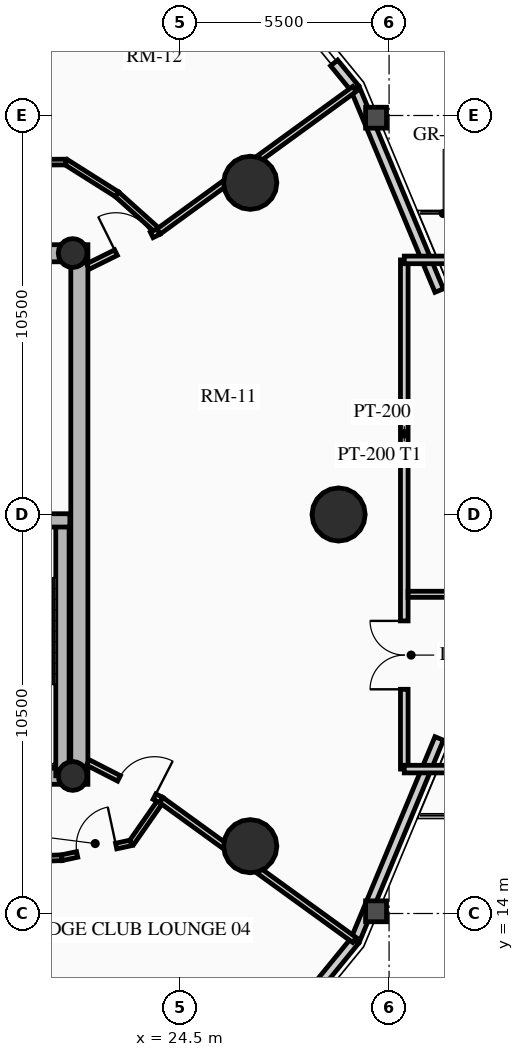
"""IFC4 building model, lengths in metres.
Left out: names, types, materials, properties, quantities, classifications, styles, units other than length and angle.
Written with IfcOpenShell. Run it as: python <this file> out.ifc"""

import sys

from ifc_helpers import new_model, si_unit, direction, frame, frame_2d, origin, origin_2d, place, context, subcontext, project, spatial, rectangle, circle, hollow_circle, extrude, source, transform, mapped, element, fill, save


model = new_model("IFC4")
c1 = context("Model", 3, precision=1e-05, world=origin(), true_north=direction((0.0, 1.0)))
c2 = subcontext(c1, "Body", "Model", "MODEL_VIEW")
j1 = project(units=[si_unit("LENGTHUNIT", "METRE"), si_unit("PLANEANGLEUNIT", "RADIAN")], contexts=[c1])
p1 = place(None, origin())
s1 = spatial("IfcSite", under=j1, at=p1, CompositionType="ELEMENT")
p2 = place(p1, origin())
s2 = spatial("IfcBuilding", under=s1, at=p2, CompositionType="ELEMENT")
p3 = place(p2, frame((0.0, 0.0, 136.6)))
s3 = spatial("IfcBuildingStorey", under=s2, at=p3, CompositionType="ELEMENT", Elevation=136.6)
p4 = place(p3, frame((21.85, 17.4, 0.0), z_axis=(0.0, 0.0, 1.0), x_axis=(0.0, 1.0, 0.0)))
e1 = element("IfcWall", 1, at=p4, inside=s3, PredefinedType="SHEAR", context=c2, shape_type="SweptSolid", body=[
    extrude(rectangle(XDim=14.2, YDim=0.45, at=frame_2d((7.1, 0.0))), origin(), (0.0, 0.0, 1.0), 3.72),
])
p5 = place(p3, frame((11.15, 17.625, 0.0), z_axis=(0.0, 0.0, 1.0), x_axis=(1.0, 0.0, 0.0)))
e2 = element("IfcWall", 2, at=p5, inside=s3, PredefinedType="SHEAR", context=c2, shape_type="SweptSolid", body=[
    extrude(rectangle(XDim=10.7, YDim=0.45, at=frame_2d((5.35, 0.0))), origin(), (0.0, 0.0, 1.0), 3.72),
])
m1 = source(origin(), c2, "Body", "SweptSolid", [
    extrude(rectangle(XDim=1.5, YDim=2.02, at=frame_2d((0.75, 1.01))), frame((0.0, 0.235, 0.0), z_axis=(0.0, -1.0, 0.0), x_axis=(1.0, 0.0, 0.0)), (0.0, 0.0, 1.0), 0.47),
])
p6 = place(p5, frame((5.45, 0.0, 0.0)))
e3 = element("IfcOpeningElement", 3, at=p6, cuts=e2, PredefinedType="OPENING", context=c2, shape_type="MappedRepresentation", body=[
    mapped(m1, transform((0.0, 0.0, 0.0), x_axis=(1.0, 0.0, 0.0), y_axis=(0.0, 1.0, 0.0), z_axis=(0.0, 0.0, 1.0), scale=1.0)),
])
p7 = place(p3, frame((11.15, 31.375, 0.0), z_axis=(0.0, 0.0, 1.0), x_axis=(1.0, 0.0, 0.0)))
e4 = element("IfcWall", 4, at=p7, inside=s3, PredefinedType="SHEAR", context=c2, shape_type="SweptSolid", body=[
    extrude(rectangle(XDim=10.7, YDim=0.45, at=frame_2d((5.35, 0.0))), origin(), (0.0, 0.0, 1.0), 3.72),
])
p8 = place(p7, frame((4.6, 0.0, 0.0)))
e5 = element("IfcOpeningElement", 5, at=p8, cuts=e4, PredefinedType="OPENING", context=c2, shape_type="MappedRepresentation", body=[
    mapped(m1, transform((0.0, 0.0, 0.0), x_axis=(1.0, 0.0, 0.0), y_axis=(0.0, 1.0, 0.0), z_axis=(0.0, 0.0, 1.0), scale=1.0)),
])
p9 = place(p3, frame((21.405, 17.625, 0.0), z_axis=(0.0, 0.0, 1.0), x_axis=(0.0, 1.0, 0.0)))
e6 = element("IfcWall", 6, at=p9, inside=s3, PredefinedType="SHEAR", context=c2, shape_type="SweptSolid", body=[
    extrude(rectangle(XDim=6.72, YDim=0.35, at=frame_2d((3.36, 0.0))), origin(), (0.0, 0.0, 1.0), 3.72),
])
p10 = place(p3, frame((18.315, 24.345, 0.0), z_axis=(0.0, 0.0, 1.0), x_axis=(1.0, 0.0, 0.0)))
e7 = element("IfcWall", 7, at=p10, inside=s3, PredefinedType="SHEAR", context=c2, shape_type="SweptSolid", body=[
    extrude(rectangle(XDim=3.285, YDim=0.35, at=frame_2d((1.643, 0.0))), origin(), (0.0, 0.0, 1.0), 3.72),
])
for number, where, z_axis, x_axis in (
    (8, (21.675, 17.62, 0.0), (0.0, 0.0, 1.0), (1.0, 0.0, 0.0)),
    (9, (21.675, 31.38, 0.0), (0.0, 0.0, 1.0), (1.0, 0.0, 0.0)),
):
    element("IfcColumn", number, at=place(p3, frame(where, z_axis=z_axis, x_axis=x_axis)), inside=s3, PredefinedType="COLUMN", context=c2, shape_type="SweptSolid", body=[
        extrude(hollow_circle(Radius=0.38, WallThickness=0.032, at=origin_2d()), origin(), (0.0, 0.0, 1.0), 3.72),
    ])
for number, where, z_axis, x_axis in (
    (10, (28.672, 24.5, 0.0), (0.0, 0.0, 1.0), (1.0, 0.0, 0.0)),
    (11, (26.347, 33.229, 0.0), (0.0, 0.0, 1.0), (1.0, 0.0, 0.0)),
    (12, (26.347, 15.771, 0.0), (0.0, 0.0, 1.0), (1.0, 0.0, 0.0)),
):
    element("IfcColumn", number, at=place(p3, frame(where, z_axis=z_axis, x_axis=x_axis)), inside=s3, PredefinedType="USERDEFINED", context=c2, shape_type="SweptSolid", body=[
        extrude(circle(Radius=0.7, at=origin_2d()), origin(), (0.0, 0.0, 1.0), 3.72),
    ])
p11 = place(p3, frame((29.105, 35.709, 0.0), z_axis=(0.0, 0.0, 1.0), x_axis=(0.384344417632, -0.923189779317, 0.0)))
e13 = element("IfcWall", 13, at=p11, inside=s3, PredefinedType="SOLIDWALL", context=c2, shape_type="SweptSolid", body=[
    extrude(rectangle(XDim=5.758, YDim=0.24, at=frame_2d((2.879, 0.0))), origin(), (0.0, 0.0, 1.0), 2.949),
])
p12 = place(p3, frame((28.555, 36.383, 0.0), z_axis=(0.0, 0.0, 1.0), x_axis=(0.632702874536, -0.774394649099, 0.0)))
e14 = element("IfcWall", 14, at=p12, inside=s3, PredefinedType="SOLIDWALL", context=c2, shape_type="SweptSolid", body=[
    extrude(rectangle(XDim=0.87, YDim=0.24, at=frame_2d((0.435, 0.0))), origin(), (0.0, 0.0, 1.0), 2.949),
])
p13 = place(p3, frame((29.105, 13.291, 0.0), z_axis=(0.0, 0.0, 1.0), x_axis=(-0.632700781152, -0.77439635945, 0.0)))
e15 = element("IfcWall", 15, at=p13, inside=s3, PredefinedType="SOLIDWALL", context=c2, shape_type="SweptSolid", body=[
    extrude(rectangle(XDim=5.448, YDim=0.24, at=frame_2d((2.724, 0.0))), origin(), (0.0, 0.0, 1.0), 2.949),
])
m2 = source(origin(), c2, "Body", "SweptSolid", [
    extrude(rectangle(XDim=2.2, YDim=1.35, at=frame_2d((1.1, 0.675))), frame((0.0, 0.13, 0.0), z_axis=(0.0, -1.0, 0.0), x_axis=(1.0, 0.0, 0.0)), (0.0, 0.0, 1.0), 0.26),
])
p14 = place(p13, frame((1.624, 0.0, 0.65)))
e16 = element("IfcOpeningElement", 16, at=p14, cuts=e15, PredefinedType="OPENING", context=c2, shape_type="MappedRepresentation", body=[
    mapped(m2, transform((0.0, 0.0, 0.0), x_axis=(1.0, 0.0, 0.0), y_axis=(0.0, 1.0, 0.0), z_axis=(0.0, 0.0, 1.0), scale=1.0)),
])
p15 = place(p3, frame((31.318, 18.607, 0.0), z_axis=(0.0, 0.0, 1.0), x_axis=(-0.384344417632, -0.923189779317, 0.0)))
e17 = element("IfcWall", 17, at=p15, inside=s3, PredefinedType="SOLIDWALL", context=c2, shape_type="SweptSolid", body=[
    extrude(rectangle(XDim=5.758, YDim=0.24, at=frame_2d((2.879, 0.0))), origin(), (0.0, 0.0, 1.0), 2.949),
])
p16 = place(p3, frame((30.4, 17.8, 0.0), z_axis=(0.0, 0.0, 1.0), x_axis=(0.0, 1.0, 0.0)))
e18 = element("IfcWall", 18, at=p16, inside=s3, PredefinedType="PARTITIONING", context=c2, shape_type="SweptSolid", body=[
    extrude(rectangle(XDim=13.4, YDim=0.2, at=frame_2d((6.7, 0.0))), origin(), (0.0, 0.0, 1.0), 2.949),
])
m3 = source(origin(), c2, "Body", "SweptSolid", [
    extrude(rectangle(XDim=1.8, YDim=2.05, at=frame_2d((0.9, 1.025))), frame((0.0, 0.11, 0.0), z_axis=(0.0, -1.0, 0.0), x_axis=(1.0, 0.0, 0.0)), (0.0, 0.0, 1.0), 0.22),
])
p17 = place(p16, frame((2.1, 0.0, 0.0)))
e19 = element("IfcOpeningElement", 19, at=p17, cuts=e18, PredefinedType="OPENING", context=c2, shape_type="MappedRepresentation", body=[
    mapped(m3, transform((0.0, 0.0, 0.0), x_axis=(1.0, 0.0, 0.0), y_axis=(0.0, 1.0, 0.0), z_axis=(0.0, 0.0, 1.0), scale=1.0)),
])
for number, where, z_axis, x_axis in (
    (20, (30.4, 31.2, 0.0), (0.0, 0.0, 1.0), (1.0, 0.0, 0.0)),
    (21, (30.4, 17.8, 0.0), (0.0, 0.0, 1.0), (1.0, 0.0, 0.0)),
):
    element("IfcWall", number, at=place(p3, frame(where, z_axis=z_axis, x_axis=x_axis)), inside=s3, PredefinedType="PARTITIONING", context=c2, shape_type="SweptSolid", body=[
        extrude(rectangle(XDim=1.95, YDim=0.2, at=frame_2d((0.975, 0.0))), origin(), (0.0, 0.0, 1.0), 2.949),
    ])
p18 = place(p3, frame((30.5, 22.4, 0.0), z_axis=(0.0, 0.0, 1.0), x_axis=(1.0, 0.0, 0.0)))
e22 = element("IfcWall", 22, at=p18, inside=s3, PredefinedType="PARTITIONING", context=c2, shape_type="SweptSolid", body=[
    extrude(rectangle(XDim=11.35, YDim=0.16, at=frame_2d((5.675, 0.0))), origin(), (0.0, 0.0, 1.0), 2.712),
])
m4 = source(origin(), c2, "Body", "SweptSolid", [
    extrude(rectangle(XDim=1.5, YDim=2.02, at=frame_2d((0.75, 1.01))), frame((0.0, 0.09, 0.0), z_axis=(0.0, -1.0, 0.0), x_axis=(1.0, 0.0, 0.0)), (0.0, 0.0, 1.0), 0.18),
])
p19 = place(p18, frame((4.9, 0.0, 0.0)))
e23 = element("IfcOpeningElement", 23, at=p19, cuts=e22, PredefinedType="OPENING", context=c2, shape_type="MappedRepresentation", body=[
    mapped(m4, transform((0.0, 0.0, 0.0), x_axis=(1.0, 0.0, 0.0), y_axis=(0.0, 1.0, 0.0), z_axis=(0.0, 0.0, 1.0), scale=1.0)),
])
p20 = place(p3, frame((23.933, 31.946, 0.0), z_axis=(0.0, 0.0, 1.0), x_axis=(-0.744529651383, 0.667589393423, 0.0)))
e24 = element("IfcWall", 24, at=p20, inside=s3, PredefinedType="PARTITIONING", context=c2, shape_type="SweptSolid", body=[
    extrude(rectangle(XDim=1.472, YDim=0.15, at=frame_2d((0.736, 0.0))), origin(), (0.0, 0.0, 1.0), 2.995),
])
p21 = place(p3, frame((22.837, 32.929, 0.0), z_axis=(0.0, 0.0, 1.0), x_axis=(-0.84581079329, 0.533482991252, 0.0)))
e25 = element("IfcWall", 25, at=p21, inside=s3, PredefinedType="PARTITIONING", context=c2, shape_type="SweptSolid", body=[
    extrude(rectangle(XDim=1.585, YDim=0.15, at=frame_2d((0.792, 0.0))), origin(), (0.0, 0.0, 1.0), 2.995),
])
p22 = place(p3, frame((21.496, 33.775, 0.0), z_axis=(0.0, 0.0, 1.0), x_axis=(-0.999989544737, -0.004572790979, 0.0)))
e26 = element("IfcWall", 26, at=p22, inside=s3, PredefinedType="PARTITIONING", context=c2, shape_type="SweptSolid", body=[
    extrude(rectangle(XDim=3.364, YDim=0.15, at=frame_2d((1.682, 0.0))), origin(), (0.0, 0.0, 1.0), 2.995),
])
m5 = source(origin(), c2, "Body", "SweptSolid", [
    extrude(rectangle(XDim=1.05, YDim=2.015, at=frame_2d((0.525, 1.007))), frame((0.0, 0.085, 0.0), z_axis=(0.0, -1.0, 0.0), x_axis=(1.0, 0.0, 0.0)), (0.0, 0.0, 1.0), 0.17),
])
p23 = place(p22, frame((1.546, 0.0, 0.0)))
e27 = element("IfcOpeningElement", 27, at=p23, cuts=e26, PredefinedType="OPENING", context=c2, shape_type="MappedRepresentation", body=[
    mapped(m5, transform((0.0, 0.0, 0.0), x_axis=(1.0, 0.0, 0.0), y_axis=(0.0, 1.0, 0.0), z_axis=(0.0, 0.0, 1.0), scale=1.0)),
])
p24 = place(p3, frame((14.792, 15.24, 0.0), z_axis=(0.0, 0.0, 1.0), x_axis=(0.999408106202, 0.034401122909, 0.0)))
e28 = element("IfcWall", 28, at=p24, inside=s3, PredefinedType="PARTITIONING", context=c2, shape_type="SweptSolid", body=[
    extrude(rectangle(XDim=6.6, YDim=0.15, at=frame_2d((3.3, 0.0))), origin(), (0.0, 0.0, 1.0), 2.995),
])
p25 = place(p3, frame((21.388, 15.468, 0.0), z_axis=(0.0, 0.0, 1.0), x_axis=(0.977672748596, 0.210133283069, 0.0)))
e29 = element("IfcWall", 29, at=p25, inside=s3, PredefinedType="PARTITIONING", context=c2, shape_type="SweptSolid", body=[
    extrude(rectangle(XDim=1.876, YDim=0.15, at=frame_2d((0.938, 0.0))), origin(), (0.0, 0.0, 1.0), 2.995),
])
p26 = place(p25, frame((0.413, 0.0, 0.0)))
e30 = element("IfcOpeningElement", 30, at=p26, cuts=e29, PredefinedType="OPENING", context=c2, shape_type="MappedRepresentation", body=[
    mapped(m5, transform((0.0, 0.0, 0.0), x_axis=(1.0, 0.0, 0.0), y_axis=(0.0, 1.0, 0.0), z_axis=(0.0, 0.0, 1.0), scale=1.0)),
])
p27 = place(p3, frame((23.222, 15.862, 0.0), z_axis=(0.0, 0.0, 1.0), x_axis=(0.571941738195, 0.820294244836, 0.0)))
e31 = element("IfcWall", 31, at=p27, inside=s3, PredefinedType="PARTITIONING", context=c2, shape_type="SweptSolid", body=[
    extrude(rectangle(XDim=1.369, YDim=0.15, at=frame_2d((0.685, 0.0))), origin(), (0.0, 0.0, 1.0), 2.995),
])
p28 = place(p3, frame((23.933, 31.946, 0.0), z_axis=(0.0, 0.0, 1.0), x_axis=(0.808636722237, 0.588308296261, 0.0)))
e32 = element("IfcWall", 32, at=p28, inside=s3, PredefinedType="PARTITIONING", context=c2, shape_type="SweptSolid", body=[
    extrude(rectangle(XDim=6.376, YDim=0.16, at=frame_2d((3.188, 0.0))), origin(), (0.0, 0.0, 1.0), 2.949),
])
p29 = place(p3, frame((24.006, 16.985, 0.0), z_axis=(0.0, 0.0, 1.0), x_axis=(0.809849730791, -0.586637378231, 0.0)))
e33 = element("IfcWall", 33, at=p29, inside=s3, PredefinedType="PARTITIONING", context=c2, shape_type="SweptSolid", body=[
    extrude(rectangle(XDim=6.277, YDim=0.16, at=frame_2d((3.139, 0.0))), origin(), (0.0, 0.0, 1.0), 2.949),
])
p30 = place(p3, frame((22.075, 31.025, 0.0), z_axis=(0.0, 0.0, 1.0), x_axis=(0.8959286695, 0.444197950432, 0.0)))
e34 = element("IfcWall", 34, at=p30, inside=s3, PredefinedType="PARTITIONING", context=c2, shape_type="SweptSolid", body=[
    extrude(rectangle(XDim=2.074, YDim=0.16, at=frame_2d((1.037, 0.0))), origin(), (0.0, 0.0, 1.0), 2.995),
])
m6 = source(origin(), c2, "Body", "SweptSolid", [
    extrude(rectangle(XDim=1.05, YDim=2.015, at=frame_2d((0.525, 1.007))), frame((0.0, 0.09, 0.0), z_axis=(0.0, -1.0, 0.0), x_axis=(1.0, 0.0, 0.0)), (0.0, 0.0, 1.0), 0.18),
])
p31 = place(p30, frame((0.824, 0.0, 0.0)))
e35 = element("IfcOpeningElement", 35, at=p31, cuts=e34, PredefinedType="OPENING", context=c2, shape_type="MappedRepresentation", body=[
    mapped(m6, transform((0.0, 0.0, 0.0), x_axis=(1.0, 0.0, 0.0), y_axis=(0.0, 1.0, 0.0), z_axis=(0.0, 0.0, 1.0), scale=1.0)),
])
p32 = place(p3, frame((22.075, 17.975, 0.0), z_axis=(0.0, 0.0, 1.0), x_axis=(0.889835034782, -0.456282380632, 0.0)))
e36 = element("IfcWall", 36, at=p32, inside=s3, PredefinedType="PARTITIONING", context=c2, shape_type="SweptSolid", body=[
    extrude(rectangle(XDim=2.17, YDim=0.16, at=frame_2d((1.085, 0.0))), origin(), (0.0, 0.0, 1.0), 2.995),
])
p33 = place(p32, frame((0.92, 0.0, 0.0)))
e37 = element("IfcOpeningElement", 37, at=p33, cuts=e36, PredefinedType="OPENING", context=c2, shape_type="MappedRepresentation", body=[
    mapped(m6, transform((0.0, 0.0, 0.0), x_axis=(1.0, 0.0, 0.0), y_axis=(0.0, 1.0, 0.0), z_axis=(0.0, 0.0, 1.0), scale=1.0)),
])
m7 = source(origin(), c2, "Body", "SweptSolid", [
    extrude(rectangle(XDim=1.8, YDim=2.05, at=frame_2d((0.9, 1.025))), frame((0.0, 0.025, 0.0), z_axis=(0.0, -1.0, 0.0), x_axis=(1.0, 0.0, 0.0)), (0.0, 0.0, 1.0), 0.05),
])
p34 = place(p17, origin())
e38 = element("IfcDoor", 38, at=p34, inside=s3, OperationType="DOUBLE_DOOR_SINGLE_SWING", PredefinedType="DOOR", context=c2, shape_type="MappedRepresentation", body=[
    mapped(m7, transform((0.0, 0.0, 0.0), x_axis=(1.0, 0.0, 0.0), y_axis=(0.0, 1.0, 0.0), z_axis=(0.0, 0.0, 1.0), scale=1.0)),
])
fill(e19, e38)
m8 = source(origin(), c2, "Body", "SweptSolid", [
    extrude(rectangle(XDim=1.05, YDim=2.015, at=frame_2d((0.525, 1.007))), frame((0.0, 0.025, 0.0), z_axis=(0.0, -1.0, 0.0), x_axis=(1.0, 0.0, 0.0)), (0.0, 0.0, 1.0), 0.05),
])
p35 = place(p31, origin())
e39 = element("IfcDoor", 39, at=p35, inside=s3, OperationType="SINGLE_SWING_LEFT", PredefinedType="DOOR", context=c2, shape_type="MappedRepresentation", body=[
    mapped(m8, transform((0.0, 0.0, 0.0), x_axis=(1.0, 0.0, 0.0), y_axis=(0.0, 1.0, 0.0), z_axis=(0.0, 0.0, 1.0), scale=1.0)),
])
fill(e35, e39)
p36 = place(p33, origin())
e40 = element("IfcDoor", 40, at=p36, inside=s3, OperationType="SINGLE_SWING_RIGHT", PredefinedType="DOOR", context=c2, shape_type="MappedRepresentation", body=[
    mapped(m8, transform((0.0, 0.0, 0.0), x_axis=(1.0, 0.0, 0.0), y_axis=(0.0, 1.0, 0.0), z_axis=(0.0, 0.0, 1.0), scale=1.0)),
])
fill(e37, e40)
p37 = place(p26, origin())
e41 = element("IfcDoor", 41, at=p37, inside=s3, OperationType="SINGLE_SWING_RIGHT", PredefinedType="DOOR", context=c2, shape_type="MappedRepresentation", body=[
    mapped(m8, transform((0.0, 0.0, 0.0), x_axis=(1.0, 0.0, 0.0), y_axis=(0.0, 1.0, 0.0), z_axis=(0.0, 0.0, 1.0), scale=1.0)),
])
fill(e30, e41)
save(model, sys.argv[1])
